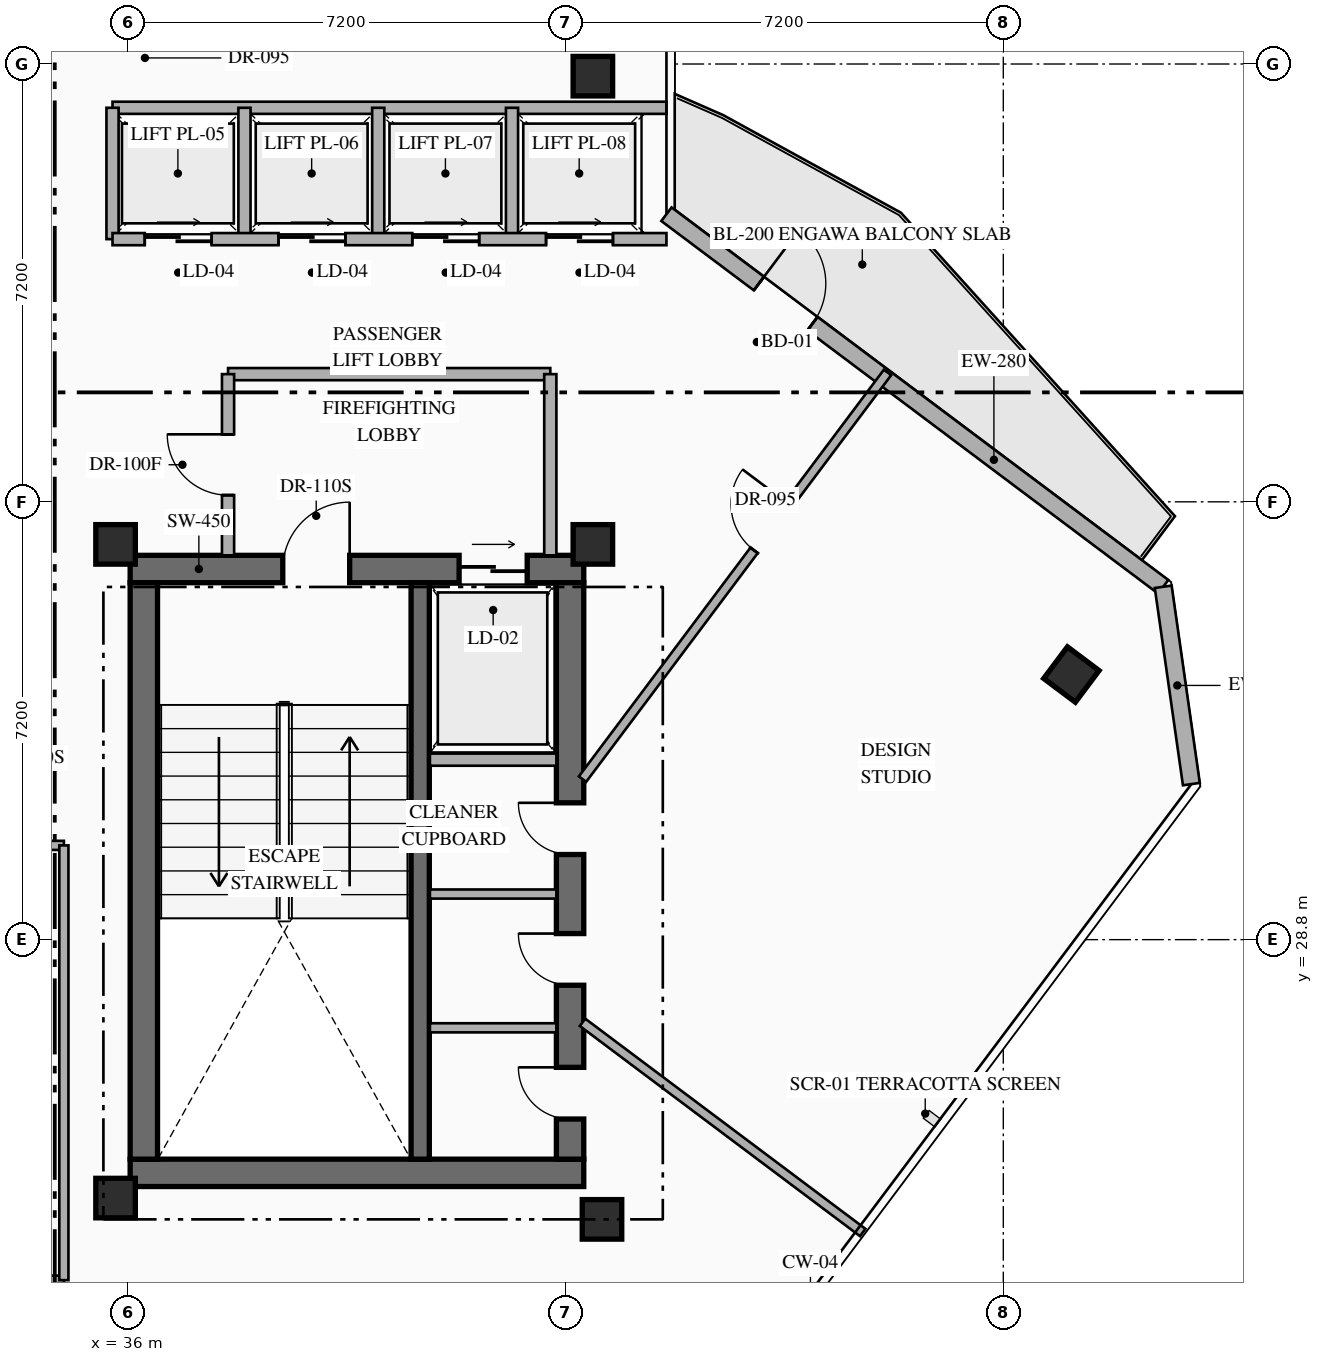
"""IFC4 building model, lengths in metres.
Left out: names, types, materials, properties, quantities, classifications, styles, units other than length and angle.
Written with IfcOpenShell. Run it as: python <this file> out.ifc"""

import sys

from ifc_helpers import new_model, si_unit, direction, frame, frame_2d, origin, origin_2d, place, context, subcontext, project, spatial, rectangle, hollow_rectangle, extrude, element, fill, save


model = new_model("IFC4")
c1 = context("Model", 3, precision=1e-05, world=origin(), true_north=direction((0.0, 1.0)))
c2 = subcontext(c1, "Body", "Model", "MODEL_VIEW")
j1 = project(units=[si_unit("LENGTHUNIT", "METRE"), si_unit("PLANEANGLEUNIT", "RADIAN")], contexts=[c1])
p1 = place(None, origin())
s1 = spatial("IfcSite", under=j1, at=p1, CompositionType="ELEMENT")
p2 = place(p1, origin())
s2 = spatial("IfcBuilding", under=s1, at=p2, CompositionType="ELEMENT")
p3 = place(p2, frame((0.0, 0.0, 239.55)))
s3 = spatial("IfcBuildingStorey", under=s2, at=p3, CompositionType="ELEMENT", Elevation=239.55)
p4 = place(p3, frame((36.04, 24.965, 0.0), z_axis=(0.0, 0.0, 1.0), x_axis=(1.0, 0.0, 0.0)))
e1 = element("IfcWall", 1, at=p4, inside=s3, PredefinedType="SHEAR", context=c2, shape_type="SweptSolid", body=[
    extrude(rectangle(XDim=7.46, YDim=0.45, at=frame_2d((3.73, 0.0))), origin(), (0.0, 0.0, 1.0), 3.6),
])
p5 = place(p3, frame((36.04, 34.895, 0.0), z_axis=(0.0, 0.0, 1.0), x_axis=(1.0, 0.0, 0.0)))
e2 = element("IfcWall", 2, at=p5, inside=s3, PredefinedType="SHEAR", context=c2, shape_type="SweptSolid", body=[
    extrude(rectangle(XDim=7.46, YDim=0.45, at=frame_2d((3.73, 0.0))), origin(), (0.0, 0.0, 1.0), 3.6),
])
p6 = place(p5, frame((2.51, 0.0, 0.0)))
e3 = element("IfcOpeningElement", 3, at=p6, cuts=e2, PredefinedType="OPENING", context=c2, shape_type="SweptSolid", body=[
    extrude(rectangle(XDim=1.1, YDim=2.2, at=frame_2d((0.55, 1.1))), frame((0.0, 0.235, 0.0), z_axis=(0.0, -1.0, 0.0), x_axis=(1.0, 0.0, 0.0)), (0.0, 0.0, 1.0), 0.47),
])
p7 = place(p5, frame((5.41, 0.0, 0.0)))
e4 = element("IfcOpeningElement", 4, at=p7, cuts=e2, PredefinedType="OPENING", context=c2, shape_type="SweptSolid", body=[
    extrude(rectangle(XDim=1.12, YDim=2.15, at=frame_2d((0.56, 1.075))), frame((0.0, 0.235, 0.0), z_axis=(0.0, -1.0, 0.0), x_axis=(1.0, 0.0, 0.0)), (0.0, 0.0, 1.0), 0.47),
])
p8 = place(p3, frame((36.265, 25.19, 0.0), z_axis=(0.0, 0.0, 1.0), x_axis=(0.0, 1.0, 0.0)))
e5 = element("IfcWall", 5, at=p8, inside=s3, PredefinedType="SHEAR", context=c2, shape_type="SweptSolid", body=[
    extrude(rectangle(XDim=9.48, YDim=0.45, at=frame_2d((4.74, 0.0))), origin(), (0.0, 0.0, 1.0), 3.6),
])
p9 = place(p3, frame((43.275, 25.19, 0.0), z_axis=(0.0, 0.0, 1.0), x_axis=(0.0, 1.0, 0.0)))
e6 = element("IfcWall", 6, at=p9, inside=s3, PredefinedType="SHEAR", context=c2, shape_type="SweptSolid", body=[
    extrude(rectangle(XDim=9.48, YDim=0.45, at=frame_2d((4.74, 0.0))), origin(), (0.0, 0.0, 1.0), 3.6),
])
p10 = place(p9, frame((0.66, 0.0, 0.0)))
e7 = element("IfcOpeningElement", 7, at=p10, cuts=e6, PredefinedType="OPENING", context=c2, shape_type="SweptSolid", body=[
    extrude(rectangle(XDim=0.85, YDim=2.08, at=frame_2d((0.425, 1.04))), frame((0.0, 0.235, 0.0), z_axis=(0.0, -1.0, 0.0), x_axis=(1.0, 0.0, 0.0)), (0.0, 0.0, 1.0), 0.47),
])
p11 = place(p9, frame((2.86, 0.0, 0.0)))
e8 = element("IfcOpeningElement", 8, at=p11, cuts=e6, PredefinedType="OPENING", context=c2, shape_type="SweptSolid", body=[
    extrude(rectangle(XDim=0.85, YDim=2.08, at=frame_2d((0.425, 1.04))), frame((0.0, 0.235, 0.0), z_axis=(0.0, -1.0, 0.0), x_axis=(1.0, 0.0, 0.0)), (0.0, 0.0, 1.0), 0.47),
])
p12 = place(p9, frame((5.01, 0.0, 0.0)))
e9 = element("IfcOpeningElement", 9, at=p12, cuts=e6, PredefinedType="OPENING", context=c2, shape_type="SweptSolid", body=[
    extrude(rectangle(XDim=0.85, YDim=2.08, at=frame_2d((0.425, 1.04))), frame((0.0, 0.235, 0.0), z_axis=(0.0, -1.0, 0.0), x_axis=(1.0, 0.0, 0.0)), (0.0, 0.0, 1.0), 0.47),
])
p13 = place(p3, frame((40.81, 25.19, 0.0), z_axis=(0.0, 0.0, 1.0), x_axis=(0.0, 1.0, 0.0)))
e10 = element("IfcWall", 10, at=p13, inside=s3, PredefinedType="SHEAR", context=c2, shape_type="SweptSolid", body=[
    extrude(rectangle(XDim=9.48, YDim=0.3, at=frame_2d((4.74, 0.0))), origin(), (0.0, 0.0, 1.0), 3.6),
])
for number, where, z_axis, x_axis in (
    (11, (35.8, 24.55, 0.0), (0.0, 0.0, 1.0), (1.0, 0.0, 0.0)),
    (12, (43.8, 24.2, 0.0), (0.0, 0.0, 1.0), (1.0, 0.0, 0.0)),
    (13, (35.8, 35.3, 0.0), (0.0, 0.0, 1.0), (1.0, 0.0, 0.0)),
    (14, (43.65, 35.3, 0.0), (0.0, 0.0, 1.0), (1.0, 0.0, 0.0)),
    (15, (43.65, 43.0, 0.0), (0.0, 0.0, 1.0), (1.0, 0.0, 0.0)),
    (16, (51.52, 33.16, 0.0), (0.0, 0.0, 1.0), (0.8, -0.6, 0.0)),
):
    element("IfcColumn", number, at=place(p3, frame(where, z_axis=z_axis, x_axis=x_axis)), inside=s3, PredefinedType="COLUMN", context=c2, shape_type="SweptSolid", body=[
        extrude(hollow_rectangle(XDim=0.65, YDim=0.65, WallThickness=0.025, at=origin_2d()), origin(), (0.0, 0.0, 1.0), 3.6),
    ])
p14 = place(p3, frame((44.86, 40.73, 0.0), z_axis=(0.0, 0.0, 1.0), x_axis=(0.800022950109, -0.599969398635, 0.0)))
e17 = element("IfcWall", 17, at=p14, inside=s3, PredefinedType="STANDARD", context=c2, shape_type="SweptSolid", body=[
    extrude(rectangle(XDim=10.212, YDim=0.28, at=frame_2d((5.106, 0.0))), origin(), (0.0, 0.0, 1.0), 3.35),
])
p15 = place(p14, frame((1.901, 0.0, 0.0)))
e18 = element("IfcOpeningElement", 18, at=p15, cuts=e17, PredefinedType="OPENING", context=c2, shape_type="SweptSolid", body=[
    extrude(rectangle(XDim=1.1, YDim=2.2, at=frame_2d((0.55, 1.1))), frame((0.0, 0.15, 0.0), z_axis=(0.0, -1.0, 0.0), x_axis=(1.0, 0.0, 0.0)), (0.0, 0.0, 1.0), 0.3),
])
p16 = place(p3, frame((53.03, 34.603, 0.0), z_axis=(0.0, 0.0, 1.0), x_axis=(0.141212810973, -0.989979263428, 0.0)))
e19 = element("IfcWall", 19, at=p16, inside=s3, PredefinedType="STANDARD", context=c2, shape_type="SweptSolid", body=[
    extrude(rectangle(XDim=3.278, YDim=0.28, at=frame_2d((1.639, 0.0))), origin(), (0.0, 0.0, 1.0), 3.35),
])
p17 = place(p3, frame((40.97, 31.76, 0.0), z_axis=(0.0, 0.0, 1.0), x_axis=(1.0, 0.0, 0.0)))
e20 = element("IfcWall", 20, at=p17, inside=s3, PredefinedType="STANDARD", context=c2, shape_type="SweptSolid", body=[
    extrude(rectangle(XDim=2.08, YDim=0.2, at=frame_2d((1.04, 0.0))), origin(), (0.0, 0.0, 1.0), 3.35),
])
for number, where, z_axis, x_axis in (
    (21, (40.97, 27.35, 0.0), (0.0, 0.0, 1.0), (1.0, 0.0, 0.0)),
    (22, (40.97, 29.55, 0.0), (0.0, 0.0, 1.0), (1.0, 0.0, 0.0)),
):
    element("IfcWall", number, at=place(p3, frame(where, z_axis=z_axis, x_axis=x_axis)), inside=s3, PredefinedType="PARTITIONING", context=c2, shape_type="SweptSolid", body=[
        extrude(rectangle(XDim=2.08, YDim=0.15, at=frame_2d((1.04, 0.0))), origin(), (0.0, 0.0, 1.0), 3.35),
    ])
p18 = place(p3, frame((37.65, 38.1, 0.0), z_axis=(0.0, 0.0, 1.0), x_axis=(1.0, 0.0, 0.0)))
e23 = element("IfcWall", 23, at=p18, inside=s3, PredefinedType="STANDARD", context=c2, shape_type="SweptSolid", body=[
    extrude(rectangle(XDim=5.3, YDim=0.2, at=frame_2d((2.65, 0.0))), origin(), (0.0, 0.0, 1.0), 3.35),
])
p19 = place(p3, frame((42.95, 35.12, 0.0), z_axis=(0.0, 0.0, 1.0), x_axis=(0.0, 1.0, 0.0)))
e24 = element("IfcWall", 24, at=p19, inside=s3, PredefinedType="STANDARD", context=c2, shape_type="SweptSolid", body=[
    extrude(rectangle(XDim=2.98, YDim=0.2, at=frame_2d((1.49, 0.0))), origin(), (0.0, 0.0, 1.0), 3.35),
])
p20 = place(p3, frame((37.65, 35.12, 0.0), z_axis=(0.0, 0.0, 1.0), x_axis=(0.0, 1.0, 0.0)))
e25 = element("IfcWall", 25, at=p20, inside=s3, PredefinedType="STANDARD", context=c2, shape_type="SweptSolid", body=[
    extrude(rectangle(XDim=2.98, YDim=0.2, at=frame_2d((1.49, 0.0))), origin(), (0.0, 0.0, 1.0), 3.35),
])
p21 = place(p20, frame((0.99, 0.0, 0.0)))
e26 = element("IfcOpeningElement", 26, at=p21, cuts=e25, PredefinedType="OPENING", context=c2, shape_type="SweptSolid", body=[
    extrude(rectangle(XDim=1.0, YDim=2.2, at=frame_2d((0.5, 1.1))), frame((0.0, 0.11, 0.0), z_axis=(0.0, -1.0, 0.0), x_axis=(1.0, 0.0, 0.0)), (0.0, 0.0, 1.0), 0.22),
])
p22 = place(p3, frame((35.75, 42.48, 0.0), z_axis=(0.0, 0.0, 1.0), x_axis=(1.0, 0.0, 0.0)))
e27 = element("IfcWall", 27, at=p22, inside=s3, PredefinedType="STANDARD", context=c2, shape_type="SweptSolid", body=[
    extrude(rectangle(XDim=9.11, YDim=0.2, at=frame_2d((4.555, 0.0))), origin(), (0.0, 0.0, 1.0), 3.35),
])
for number, where, z_axis, x_axis in (
    (28, (35.75, 40.32, 0.0), (0.0, 0.0, 1.0), (0.0, 1.0, 0.0)),
    (29, (37.92, 40.32, 0.0), (0.0, 0.0, 1.0), (0.0, 1.0, 0.0)),
    (30, (40.12, 40.32, 0.0), (0.0, 0.0, 1.0), (0.0, 1.0, 0.0)),
    (31, (42.32, 40.32, 0.0), (0.0, 0.0, 1.0), (0.0, 1.0, 0.0)),
):
    element("IfcWall", number, at=place(p3, frame(where, z_axis=z_axis, x_axis=x_axis)), inside=s3, PredefinedType="STANDARD", context=c2, shape_type="SweptSolid", body=[
        extrude(rectangle(XDim=2.16, YDim=0.2, at=frame_2d((1.08, 0.0))), origin(), (0.0, 0.0, 1.0), 3.35),
    ])
p23 = place(p3, frame((35.75, 40.32, 0.0), z_axis=(0.0, 0.0, 1.0), x_axis=(1.0, 0.0, 0.0)))
e32 = element("IfcWall", 32, at=p23, inside=s3, PredefinedType="STANDARD", context=c2, shape_type="SweptSolid", body=[
    extrude(rectangle(XDim=9.11, YDim=0.2, at=frame_2d((4.555, 0.0))), origin(), (0.0, 0.0, 1.0), 3.35),
])
p24 = place(p23, frame((0.53, 0.0, 0.0)))
e33 = element("IfcOpeningElement", 33, at=p24, cuts=e32, PredefinedType="OPENING", context=c2, shape_type="SweptSolid", body=[
    extrude(rectangle(XDim=1.1, YDim=2.18, at=frame_2d((0.55, 1.09))), frame((0.0, 0.11, 0.0), z_axis=(0.0, -1.0, 0.0), x_axis=(1.0, 0.0, 0.0)), (0.0, 0.0, 1.0), 0.22),
])
p25 = place(p23, frame((2.73, 0.0, 0.0)))
e34 = element("IfcOpeningElement", 34, at=p25, cuts=e32, PredefinedType="OPENING", context=c2, shape_type="SweptSolid", body=[
    extrude(rectangle(XDim=1.1, YDim=2.18, at=frame_2d((0.55, 1.09))), frame((0.0, 0.11, 0.0), z_axis=(0.0, -1.0, 0.0), x_axis=(1.0, 0.0, 0.0)), (0.0, 0.0, 1.0), 0.22),
])
p26 = place(p23, frame((4.93, 0.0, 0.0)))
e35 = element("IfcOpeningElement", 35, at=p26, cuts=e32, PredefinedType="OPENING", context=c2, shape_type="SweptSolid", body=[
    extrude(rectangle(XDim=1.1, YDim=2.18, at=frame_2d((0.55, 1.09))), frame((0.0, 0.11, 0.0), z_axis=(0.0, -1.0, 0.0), x_axis=(1.0, 0.0, 0.0)), (0.0, 0.0, 1.0), 0.22),
])
p27 = place(p23, frame((7.13, 0.0, 0.0)))
e36 = element("IfcOpeningElement", 36, at=p27, cuts=e32, PredefinedType="OPENING", context=c2, shape_type="SweptSolid", body=[
    extrude(rectangle(XDim=1.1, YDim=2.18, at=frame_2d((0.55, 1.09))), frame((0.0, 0.11, 0.0), z_axis=(0.0, -1.0, 0.0), x_axis=(1.0, 0.0, 0.0)), (0.0, 0.0, 1.0), 0.22),
])
p28 = place(p3, frame((25.55, 23.2, 0.0), z_axis=(0.0, 0.0, 1.0), x_axis=(1.0, 0.0, 0.0)))
e37 = element("IfcWall", 37, at=p28, inside=s3, PredefinedType="PARTITIONING", context=c2, shape_type="SweptSolid", body=[
    extrude(rectangle(XDim=9.4, YDim=0.15, at=frame_2d((4.7, 0.0))), origin(), (0.0, 0.0, 1.0), 3.35),
])
p29 = place(p3, frame((25.55, 30.35, 0.0), z_axis=(0.0, 0.0, 1.0), x_axis=(1.0, 0.0, 0.0)))
e38 = element("IfcWall", 38, at=p29, inside=s3, PredefinedType="PARTITIONING", context=c2, shape_type="SweptSolid", body=[
    extrude(rectangle(XDim=9.4, YDim=0.15, at=frame_2d((4.7, 0.0))), origin(), (0.0, 0.0, 1.0), 3.35),
])
p30 = place(p29, frame((7.638, 0.0, 0.0)))
e39 = element("IfcOpeningElement", 39, at=p30, cuts=e38, PredefinedType="OPENING", context=c2, shape_type="SweptSolid", body=[
    extrude(rectangle(XDim=1.0, YDim=2.15, at=frame_2d((0.5, 1.075))), frame((0.0, 0.085, 0.0), z_axis=(0.0, -1.0, 0.0), x_axis=(1.0, 0.0, 0.0)), (0.0, 0.0, 1.0), 0.17),
])
p31 = place(p3, frame((34.95, 23.2, 0.0), z_axis=(0.0, 0.0, 1.0), x_axis=(0.0, 1.0, 0.0)))
e40 = element("IfcWall", 40, at=p31, inside=s3, PredefinedType="PARTITIONING", context=c2, shape_type="SweptSolid", body=[
    extrude(rectangle(XDim=7.15, YDim=0.15, at=frame_2d((3.575, 0.0))), origin(), (0.0, 0.0, 1.0), 3.35),
])
p32 = place(p3, frame((43.48, 27.44, 0.0), z_axis=(0.0, 0.0, 1.0), x_axis=(0.79998982729, -0.600013563374, 0.0)))
e41 = element("IfcWall", 41, at=p32, inside=s3, PredefinedType="PARTITIONING", context=c2, shape_type="SweptSolid", body=[
    extrude(rectangle(XDim=5.76, YDim=0.15, at=frame_2d((2.88, 0.0))), origin(), (0.0, 0.0, 1.0), 3.35),
])
p33 = place(p3, frame((43.48, 31.44, 0.0), z_axis=(0.0, 0.0, 1.0), x_axis=(0.600009344989, 0.799992991173, 0.0)))
e42 = element("IfcWall", 42, at=p33, inside=s3, PredefinedType="PARTITIONING", context=c2, shape_type="SweptSolid", body=[
    extrude(rectangle(XDim=8.36, YDim=0.15, at=frame_2d((4.18, 0.0))), origin(), (0.0, 0.0, 1.0), 3.35),
])
p34 = place(p33, frame((4.703, 0.0, 0.0)))
e43 = element("IfcOpeningElement", 43, at=p34, cuts=e42, PredefinedType="OPENING", context=c2, shape_type="SweptSolid", body=[
    extrude(rectangle(XDim=0.95, YDim=2.15, at=frame_2d((0.475, 1.075))), frame((0.0, 0.085, 0.0), z_axis=(0.0, -1.0, 0.0), x_axis=(1.0, 0.0, 0.0)), (0.0, 0.0, 1.0), 0.17),
])
p35 = place(p3, frame((27.91, 26.68, 0.0), z_axis=(0.0, 0.0, 1.0), x_axis=(0.8, -0.6, 0.0)))
e44 = element("IfcWall", 44, at=p35, inside=s3, PredefinedType="PARTITIONING", context=c2, shape_type="SweptSolid", body=[
    extrude(rectangle(XDim=17.76, YDim=0.15, at=frame_2d((8.88, 0.0))), origin(), (0.0, 0.0, 1.0), 3.35),
])
p36 = place(p35, frame((11.294, 0.0, 0.0)))
e45 = element("IfcOpeningElement", 45, at=p36, cuts=e44, PredefinedType="OPENING", context=c2, shape_type="SweptSolid", body=[
    extrude(rectangle(XDim=0.95, YDim=2.15, at=frame_2d((0.475, 1.075))), frame((0.0, 0.085, 0.0), z_axis=(0.0, -1.0, 0.0), x_axis=(1.0, 0.0, 0.0)), (0.0, 0.0, 1.0), 0.17),
])
p37 = place(p15, origin())
e46 = element("IfcDoor", 46, at=p37, inside=s3, OperationType="SINGLE_SWING_LEFT", PredefinedType="DOOR", context=c2, shape_type="SweptSolid", body=[
    extrude(rectangle(XDim=1.1, YDim=2.2, at=frame_2d((0.55, 1.1))), frame((0.0, 0.025, 0.0), z_axis=(0.0, -1.0, 0.0), x_axis=(1.0, 0.0, 0.0)), (0.0, 0.0, 1.0), 0.05),
])
fill(e18, e46)
p38 = place(p6, origin())
e47 = element("IfcDoor", 47, at=p38, inside=s3, OperationType="SINGLE_SWING_RIGHT", PredefinedType="DOOR", context=c2, shape_type="SweptSolid", body=[
    extrude(rectangle(XDim=1.1, YDim=2.2, at=frame_2d((0.55, 1.1))), frame((0.0, 0.025, 0.0), z_axis=(0.0, -1.0, 0.0), x_axis=(1.0, 0.0, 0.0)), (0.0, 0.0, 1.0), 0.05),
])
fill(e3, e47)
p39 = place(p7, origin())
e48 = element("IfcDoor", 48, at=p39, inside=s3, OperationType="SLIDING_TO_RIGHT", PredefinedType="USERDEFINED", context=c2, shape_type="SweptSolid", body=[
    extrude(rectangle(XDim=1.12, YDim=2.15, at=frame_2d((0.56, 1.075))), frame((0.0, 0.025, 0.0), z_axis=(0.0, -1.0, 0.0), x_axis=(1.0, 0.0, 0.0)), (0.0, 0.0, 1.0), 0.05),
])
fill(e4, e48)
p40 = place(p10, origin())
e49 = element("IfcDoor", 49, at=p40, inside=s3, OperationType="SINGLE_SWING_RIGHT", PredefinedType="DOOR", context=c2, shape_type="SweptSolid", body=[
    extrude(rectangle(XDim=0.85, YDim=2.08, at=frame_2d((0.425, 1.04))), frame((0.0, 0.025, 0.0), z_axis=(0.0, -1.0, 0.0), x_axis=(1.0, 0.0, 0.0)), (0.0, 0.0, 1.0), 0.05),
])
fill(e7, e49)
p41 = place(p11, origin())
e50 = element("IfcDoor", 50, at=p41, inside=s3, OperationType="SINGLE_SWING_RIGHT", PredefinedType="DOOR", context=c2, shape_type="SweptSolid", body=[
    extrude(rectangle(XDim=0.85, YDim=2.08, at=frame_2d((0.425, 1.04))), frame((0.0, 0.025, 0.0), z_axis=(0.0, -1.0, 0.0), x_axis=(1.0, 0.0, 0.0)), (0.0, 0.0, 1.0), 0.05),
])
fill(e8, e50)
p42 = place(p12, origin())
e51 = element("IfcDoor", 51, at=p42, inside=s3, OperationType="SINGLE_SWING_RIGHT", PredefinedType="DOOR", context=c2, shape_type="SweptSolid", body=[
    extrude(rectangle(XDim=0.85, YDim=2.08, at=frame_2d((0.425, 1.04))), frame((0.0, 0.025, 0.0), z_axis=(0.0, -1.0, 0.0), x_axis=(1.0, 0.0, 0.0)), (0.0, 0.0, 1.0), 0.05),
])
fill(e9, e51)
p43 = place(p21, origin())
e52 = element("IfcDoor", 52, at=p43, inside=s3, OperationType="SINGLE_SWING_RIGHT", PredefinedType="DOOR", context=c2, shape_type="SweptSolid", body=[
    extrude(rectangle(XDim=1.0, YDim=2.2, at=frame_2d((0.5, 1.1))), frame((0.0, 0.025, 0.0), z_axis=(0.0, -1.0, 0.0), x_axis=(1.0, 0.0, 0.0)), (0.0, 0.0, 1.0), 0.05),
])
fill(e26, e52)
p44 = place(p24, origin())
e53 = element("IfcDoor", 53, at=p44, inside=s3, OperationType="SLIDING_TO_RIGHT", PredefinedType="USERDEFINED", context=c2, shape_type="SweptSolid", body=[
    extrude(rectangle(XDim=1.1, YDim=2.18, at=frame_2d((0.55, 1.09))), frame((0.0, 0.025, 0.0), z_axis=(0.0, -1.0, 0.0), x_axis=(1.0, 0.0, 0.0)), (0.0, 0.0, 1.0), 0.05),
])
fill(e33, e53)
p45 = place(p25, origin())
e54 = element("IfcDoor", 54, at=p45, inside=s3, OperationType="SLIDING_TO_RIGHT", PredefinedType="USERDEFINED", context=c2, shape_type="SweptSolid", body=[
    extrude(rectangle(XDim=1.1, YDim=2.18, at=frame_2d((0.55, 1.09))), frame((0.0, 0.025, 0.0), z_axis=(0.0, -1.0, 0.0), x_axis=(1.0, 0.0, 0.0)), (0.0, 0.0, 1.0), 0.05),
])
fill(e34, e54)
p46 = place(p26, origin())
e55 = element("IfcDoor", 55, at=p46, inside=s3, OperationType="SLIDING_TO_RIGHT", PredefinedType="USERDEFINED", context=c2, shape_type="SweptSolid", body=[
    extrude(rectangle(XDim=1.1, YDim=2.18, at=frame_2d((0.55, 1.09))), frame((0.0, 0.025, 0.0), z_axis=(0.0, -1.0, 0.0), x_axis=(1.0, 0.0, 0.0)), (0.0, 0.0, 1.0), 0.05),
])
fill(e35, e55)
p47 = place(p27, origin())
e56 = element("IfcDoor", 56, at=p47, inside=s3, OperationType="SLIDING_TO_RIGHT", PredefinedType="USERDEFINED", context=c2, shape_type="SweptSolid", body=[
    extrude(rectangle(XDim=1.1, YDim=2.18, at=frame_2d((0.55, 1.09))), frame((0.0, 0.025, 0.0), z_axis=(0.0, -1.0, 0.0), x_axis=(1.0, 0.0, 0.0)), (0.0, 0.0, 1.0), 0.05),
])
fill(e36, e56)
p48 = place(p34, origin())
e57 = element("IfcDoor", 57, at=p48, inside=s3, OperationType="SINGLE_SWING_RIGHT", PredefinedType="DOOR", context=c2, shape_type="SweptSolid", body=[
    extrude(rectangle(XDim=0.95, YDim=2.15, at=frame_2d((0.475, 1.075))), frame((0.0, 0.025, 0.0), z_axis=(0.0, -1.0, 0.0), x_axis=(1.0, 0.0, 0.0)), (0.0, 0.0, 1.0), 0.05),
])
fill(e43, e57)
save(model, sys.argv[1])
